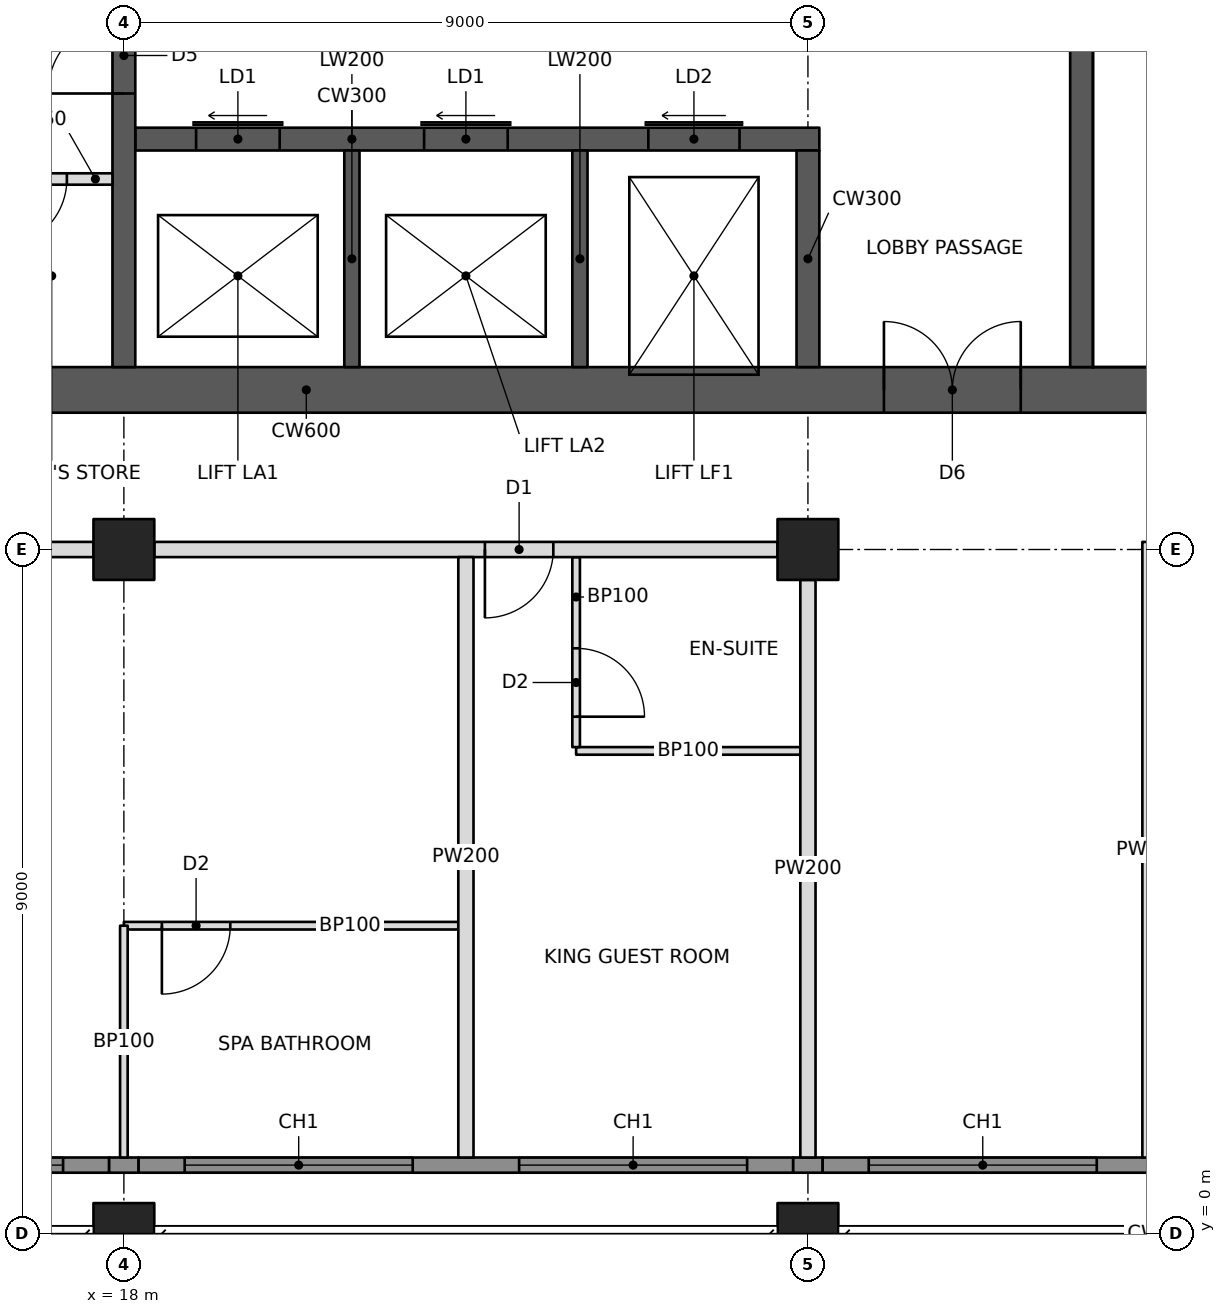
"""IFC4 building model, lengths in metres.
Left out: names, types, materials, properties, quantities, classifications, styles, units other than length and angle.
Written with IfcOpenShell. Run it as: python <this file> out.ifc"""

import sys

from ifc_helpers import new_model, si_unit, direction, frame, frame_2d, origin, origin_2d, place, context, subcontext, project, spatial, rectangle, hollow_rectangle, extrude, element, fill, save


model = new_model("IFC4")
c1 = context("Model", 3, precision=1e-05, world=origin(), true_north=direction((0.0, 1.0)))
c2 = subcontext(c1, "Body", "Model", "MODEL_VIEW")
j1 = project(units=[si_unit("LENGTHUNIT", "METRE"), si_unit("PLANEANGLEUNIT", "RADIAN")], contexts=[c1])
p1 = place(None, origin())
s1 = spatial("IfcSite", under=j1, at=p1, CompositionType="ELEMENT")
p2 = place(p1, origin())
s2 = spatial("IfcBuilding", under=s1, at=p2, CompositionType="ELEMENT")
p3 = place(p2, frame((0.0, 0.0, 51.8)))
s3 = spatial("IfcBuildingStorey", under=s2, at=p3, CompositionType="ELEMENT", Elevation=51.8)
for number, where, z_axis, x_axis in (
    (1, (18.0, 0.0, 0.0), (0.0, 0.0, 1.0), (1.0, 0.0, 0.0)),
    (2, (18.0, 9.0, 0.0), (0.0, 0.0, 1.0), (1.0, 0.0, 0.0)),
    (3, (27.0, 0.0, 0.0), (0.0, 0.0, 1.0), (1.0, 0.0, 0.0)),
    (4, (27.0, 9.0, 0.0), (0.0, 0.0, 1.0), (1.0, 0.0, 0.0)),
):
    element("IfcColumn", number, at=place(p3, frame(where, z_axis=z_axis, x_axis=x_axis)), inside=s3, PredefinedType="COLUMN", context=c2, shape_type="SweptSolid", body=[
        extrude(hollow_rectangle(XDim=0.8, YDim=0.8, WallThickness=0.1, at=origin_2d()), origin(), (0.0, 0.0, 1.0), 3.4),
    ])
p4 = place(p3, frame((10.8, 11.1, 0.0), z_axis=(0.0, 0.0, 1.0), x_axis=(1.0, 0.0, 0.0)))
e5 = element("IfcWall", 5, at=p4, inside=s3, PredefinedType="SHEAR", context=c2, shape_type="SweptSolid", body=[
    extrude(rectangle(XDim=23.4, YDim=0.6, at=frame_2d((11.7, 0.0))), origin(), (0.0, 0.0, 1.0), 3.4),
])
p5 = place(p4, frame((1.0, 0.0, 0.0)))
e6 = element("IfcOpeningElement", 6, at=p5, cuts=e5, PredefinedType="OPENING", context=c2, shape_type="SweptSolid", body=[
    extrude(rectangle(XDim=1.0, YDim=2.1, at=frame_2d((0.5, 1.05))), frame((0.0, 0.31, 0.0), z_axis=(0.0, -1.0, 0.0), x_axis=(1.0, 0.0, 0.0)), (0.0, 0.0, 1.0), 0.62),
])
p6 = place(p4, frame((17.2, 0.0, 0.0)))
e7 = element("IfcOpeningElement", 7, at=p6, cuts=e5, PredefinedType="OPENING", context=c2, shape_type="SweptSolid", body=[
    extrude(rectangle(XDim=1.8, YDim=2.1, at=frame_2d((0.9, 1.05))), frame((0.0, 0.31, 0.0), z_axis=(0.0, -1.0, 0.0), x_axis=(1.0, 0.0, 0.0)), (0.0, 0.0, 1.0), 0.62),
])
p7 = place(p3, frame((18.0, 11.4, 0.0), z_axis=(0.0, 0.0, 1.0), x_axis=(0.0, 1.0, 0.0)))
e8 = element("IfcWall", 8, at=p7, inside=s3, PredefinedType="SHEAR", context=c2, shape_type="SweptSolid", body=[
    extrude(rectangle(XDim=13.2, YDim=0.3, at=frame_2d((6.6, 0.0))), origin(), (0.0, 0.0, 1.0), 3.4),
])
p8 = place(p7, frame((3.6, 0.0, 0.0)))
e9 = element("IfcOpeningElement", 9, at=p8, cuts=e8, PredefinedType="OPENING", context=c2, shape_type="SweptSolid", body=[
    extrude(rectangle(XDim=1.0, YDim=2.1, at=frame_2d((0.5, 1.05))), frame((0.0, 0.16, 0.0), z_axis=(0.0, -1.0, 0.0), x_axis=(1.0, 0.0, 0.0)), (0.0, 0.0, 1.0), 0.32),
])
p9 = place(p7, frame((8.2, 0.0, 0.0)))
e10 = element("IfcOpeningElement", 10, at=p9, cuts=e8, PredefinedType="OPENING", context=c2, shape_type="SweptSolid", body=[
    extrude(rectangle(XDim=1.0, YDim=2.1, at=frame_2d((0.5, 1.05))), frame((0.0, 0.16, 0.0), z_axis=(0.0, -1.0, 0.0), x_axis=(1.0, 0.0, 0.0)), (0.0, 0.0, 1.0), 0.32),
])
p10 = place(p3, frame((18.15, 14.4, 0.0), z_axis=(0.0, 0.0, 1.0), x_axis=(1.0, 0.0, 0.0)))
e11 = element("IfcWall", 11, at=p10, inside=s3, PredefinedType="SHEAR", context=c2, shape_type="SweptSolid", body=[
    extrude(rectangle(XDim=9.0, YDim=0.3, at=frame_2d((4.5, 0.0))), origin(), (0.0, 0.0, 1.0), 3.4),
])
p11 = place(p10, frame((0.8, 0.0, 0.0)))
e12 = element("IfcOpeningElement", 12, at=p11, cuts=e11, PredefinedType="OPENING", context=c2, shape_type="SweptSolid", body=[
    extrude(rectangle(XDim=1.1, YDim=2.1, at=frame_2d((0.55, 1.05))), frame((0.0, 0.16, 0.0), z_axis=(0.0, -1.0, 0.0), x_axis=(1.0, 0.0, 0.0)), (0.0, 0.0, 1.0), 0.32),
])
p12 = place(p10, frame((3.8, 0.0, 0.0)))
e13 = element("IfcOpeningElement", 13, at=p12, cuts=e11, PredefinedType="OPENING", context=c2, shape_type="SweptSolid", body=[
    extrude(rectangle(XDim=1.1, YDim=2.1, at=frame_2d((0.55, 1.05))), frame((0.0, 0.16, 0.0), z_axis=(0.0, -1.0, 0.0), x_axis=(1.0, 0.0, 0.0)), (0.0, 0.0, 1.0), 0.32),
])
p13 = place(p10, frame((6.75, 0.0, 0.0)))
e14 = element("IfcOpeningElement", 14, at=p13, cuts=e11, PredefinedType="OPENING", context=c2, shape_type="SweptSolid", body=[
    extrude(rectangle(XDim=1.2, YDim=2.1, at=frame_2d((0.6, 1.05))), frame((0.0, 0.16, 0.0), z_axis=(0.0, -1.0, 0.0), x_axis=(1.0, 0.0, 0.0)), (0.0, 0.0, 1.0), 0.32),
])
p14 = place(p3, frame((27.0, 11.4, 0.0), z_axis=(0.0, 0.0, 1.0), x_axis=(0.0, 1.0, 0.0)))
e15 = element("IfcWall", 15, at=p14, inside=s3, PredefinedType="SHEAR", context=c2, shape_type="SweptSolid", body=[
    extrude(rectangle(XDim=2.85, YDim=0.3, at=frame_2d((1.425, 0.0))), origin(), (0.0, 0.0, 1.0), 3.4),
])
for number, where, z_axis, x_axis in (
    (16, (21.0, 11.4, 0.0), (0.0, 0.0, 1.0), (0.0, 1.0, 0.0)),
    (17, (24.0, 11.4, 0.0), (0.0, 0.0, 1.0), (0.0, 1.0, 0.0)),
):
    element("IfcWall", number, at=place(p3, frame(where, z_axis=z_axis, x_axis=x_axis)), inside=s3, PredefinedType="SHEAR", context=c2, shape_type="SweptSolid", body=[
        extrude(rectangle(XDim=2.85, YDim=0.2, at=frame_2d((1.425, 0.0))), origin(), (0.0, 0.0, 1.0), 3.4),
    ])
p15 = place(p3, frame((30.6, 11.4, 0.0), z_axis=(0.0, 0.0, 1.0), x_axis=(0.0, 1.0, 0.0)))
e18 = element("IfcWall", 18, at=p15, inside=s3, PredefinedType="SHEAR", context=c2, shape_type="SweptSolid", body=[
    extrude(rectangle(XDim=13.2, YDim=0.3, at=frame_2d((6.6, 0.0))), origin(), (0.0, 0.0, 1.0), 3.4),
])
p16 = place(p3, frame((9.4, 9.0, 0.0), z_axis=(0.0, 0.0, 1.0), x_axis=(1.0, 0.0, 0.0)))
e19 = element("IfcWall", 19, at=p16, inside=s3, PredefinedType="PARTITIONING", context=c2, shape_type="SweptSolid", body=[
    extrude(rectangle(XDim=8.2, YDim=0.2, at=frame_2d((4.1, 0.0))), origin(), (0.0, 0.0, 1.0), 2.405),
])
p17 = place(p16, frame((2.95, 0.0, 0.0)))
e20 = element("IfcOpeningElement", 20, at=p17, cuts=e19, PredefinedType="OPENING", context=c2, shape_type="SweptSolid", body=[
    extrude(rectangle(XDim=0.9, YDim=2.1, at=frame_2d((0.45, 1.05))), frame((0.0, 0.11, 0.0), z_axis=(0.0, -1.0, 0.0), x_axis=(1.0, 0.0, 0.0)), (0.0, 0.0, 1.0), 0.22),
])
p18 = place(p16, frame((4.35, 0.0, 0.0)))
e21 = element("IfcOpeningElement", 21, at=p18, cuts=e19, PredefinedType="OPENING", context=c2, shape_type="SweptSolid", body=[
    extrude(rectangle(XDim=0.9, YDim=2.1, at=frame_2d((0.45, 1.05))), frame((0.0, 0.11, 0.0), z_axis=(0.0, -1.0, 0.0), x_axis=(1.0, 0.0, 0.0)), (0.0, 0.0, 1.0), 0.22),
])
p19 = place(p3, frame((18.4, 9.0, 0.0), z_axis=(0.0, 0.0, 1.0), x_axis=(1.0, 0.0, 0.0)))
e22 = element("IfcWall", 22, at=p19, inside=s3, PredefinedType="PARTITIONING", context=c2, shape_type="SweptSolid", body=[
    extrude(rectangle(XDim=8.2, YDim=0.2, at=frame_2d((4.1, 0.0))), origin(), (0.0, 0.0, 1.0), 2.405),
])
p20 = place(p19, frame((4.35, 0.0, 0.0)))
e23 = element("IfcOpeningElement", 23, at=p20, cuts=e22, PredefinedType="OPENING", context=c2, shape_type="SweptSolid", body=[
    extrude(rectangle(XDim=0.9, YDim=2.1, at=frame_2d((0.45, 1.05))), frame((0.0, 0.11, 0.0), z_axis=(0.0, -1.0, 0.0), x_axis=(1.0, 0.0, 0.0)), (0.0, 0.0, 1.0), 0.22),
])
p21 = place(p3, frame((22.5, 8.9, 0.0), z_axis=(0.0, 0.0, 1.0), x_axis=(0.0, -1.0, 0.0)))
e24 = element("IfcWall", 24, at=p21, inside=s3, PredefinedType="PARTITIONING", context=c2, shape_type="SweptSolid", body=[
    extrude(rectangle(XDim=7.9, YDim=0.2, at=frame_2d((3.95, 0.0))), origin(), (0.0, 0.0, 1.0), 2.404),
])
p22 = place(p3, frame((27.0, 8.6, 0.0), z_axis=(0.0, 0.0, 1.0), x_axis=(0.0, -1.0, 0.0)))
e25 = element("IfcWall", 25, at=p22, inside=s3, PredefinedType="PARTITIONING", context=c2, shape_type="SweptSolid", body=[
    extrude(rectangle(XDim=7.6, YDim=0.2, at=frame_2d((3.8, 0.0))), origin(), (0.0, 0.0, 1.0), 2.405),
])
p23 = place(p3, frame((31.5, 9.1, 0.0), z_axis=(0.0, 0.0, 1.0), x_axis=(0.0, -1.0, 0.0)))
e26 = element("IfcWall", 26, at=p23, inside=s3, PredefinedType="PARTITIONING", context=c2, shape_type="SweptSolid", body=[
    extrude(rectangle(XDim=8.1, YDim=0.2, at=frame_2d((4.05, 0.0))), origin(), (0.0, 0.0, 1.0), 2.404),
])
p24 = place(p3, frame((18.0, 4.05, 0.0), z_axis=(0.0, 0.0, 1.0), x_axis=(1.0, 0.0, 0.0)))
e27 = element("IfcWall", 27, at=p24, inside=s3, PredefinedType="PARTITIONING", context=c2, shape_type="SweptSolid", body=[
    extrude(rectangle(XDim=4.4, YDim=0.1, at=frame_2d((2.2, 0.0))), origin(), (0.0, 0.0, 1.0), 2.404),
])
p25 = place(p24, frame((0.5, 0.0, 0.0)))
e28 = element("IfcOpeningElement", 28, at=p25, cuts=e27, PredefinedType="OPENING", context=c2, shape_type="SweptSolid", body=[
    extrude(rectangle(XDim=0.9, YDim=2.1, at=frame_2d((0.45, 1.05))), frame((0.0, 0.06, 0.0), z_axis=(0.0, -1.0, 0.0), x_axis=(1.0, 0.0, 0.0)), (0.0, 0.0, 1.0), 0.12),
])
p26 = place(p3, frame((18.0, 4.05, 0.0), z_axis=(0.0, 0.0, 1.0), x_axis=(0.0, -1.0, 0.0)))
e29 = element("IfcWall", 29, at=p26, inside=s3, PredefinedType="PARTITIONING", context=c2, shape_type="SweptSolid", body=[
    extrude(rectangle(XDim=3.05, YDim=0.1, at=frame_2d((1.525, 0.0))), origin(), (0.0, 0.0, 1.0), 2.405),
])
p27 = place(p3, frame((23.95, 6.35, 0.0), z_axis=(0.0, 0.0, 1.0), x_axis=(1.0, 0.0, 0.0)))
e30 = element("IfcWall", 30, at=p27, inside=s3, PredefinedType="PARTITIONING", context=c2, shape_type="SweptSolid", body=[
    extrude(rectangle(XDim=2.95, YDim=0.1, at=frame_2d((1.475, 0.0))), origin(), (0.0, 0.0, 1.0), 2.404),
])
p28 = place(p3, frame((23.95, 8.9, 0.0), z_axis=(0.0, 0.0, 1.0), x_axis=(0.0, -1.0, 0.0)))
e31 = element("IfcWall", 31, at=p28, inside=s3, PredefinedType="PARTITIONING", context=c2, shape_type="SweptSolid", body=[
    extrude(rectangle(XDim=2.5, YDim=0.1, at=frame_2d((1.25, 0.0))), origin(), (0.0, 0.0, 1.0), 2.404),
])
p29 = place(p28, frame((1.2, 0.0, 0.0)))
e32 = element("IfcOpeningElement", 32, at=p29, cuts=e31, PredefinedType="OPENING", context=c2, shape_type="SweptSolid", body=[
    extrude(rectangle(XDim=0.9, YDim=2.1, at=frame_2d((0.45, 1.05))), frame((0.0, 0.06, 0.0), z_axis=(0.0, -1.0, 0.0), x_axis=(1.0, 0.0, 0.0)), (0.0, 0.0, 1.0), 0.12),
])
p30 = place(p3, frame((14.55, 13.875, 0.0), z_axis=(0.0, 0.0, 1.0), x_axis=(1.0, 0.0, 0.0)))
e33 = element("IfcWall", 33, at=p30, inside=s3, PredefinedType="PARTITIONING", context=c2, shape_type="SweptSolid", body=[
    extrude(rectangle(XDim=3.3, YDim=0.15, at=frame_2d((1.65, 0.0))), origin(), (0.0, 0.0, 1.0), 3.2),
])
p31 = place(p30, frame((0.2, 0.0, 0.0)))
e34 = element("IfcOpeningElement", 34, at=p31, cuts=e33, PredefinedType="OPENING", context=c2, shape_type="SweptSolid", body=[
    extrude(rectangle(XDim=0.9, YDim=2.1, at=frame_2d((0.45, 1.05))), frame((0.0, 0.085, 0.0), z_axis=(0.0, -1.0, 0.0), x_axis=(1.0, 0.0, 0.0)), (0.0, 0.0, 1.0), 0.17),
])
p32 = place(p30, frame((1.8, 0.0, 0.0)))
e35 = element("IfcOpeningElement", 35, at=p32, cuts=e33, PredefinedType="OPENING", context=c2, shape_type="SweptSolid", body=[
    extrude(rectangle(XDim=0.9, YDim=2.1, at=frame_2d((0.45, 1.05))), frame((0.0, 0.085, 0.0), z_axis=(0.0, -1.0, 0.0), x_axis=(1.0, 0.0, 0.0)), (0.0, 0.0, 1.0), 0.17),
])
p33 = place(p3, frame((9.135, 0.9, 0.0), z_axis=(0.0, 0.0, 1.0), x_axis=(1.0, 0.0, 0.0)))
e36 = element("IfcWall", 36, at=p33, inside=s3, PredefinedType="SOLIDWALL", context=c2, shape_type="SweptSolid", body=[
    extrude(rectangle(XDim=8.671, YDim=0.2, at=frame_2d((4.335, 0.0))), origin(), (0.0, 0.0, 1.0), 3.2),
])
p34 = place(p33, frame((0.665, 0.0, 0.6)))
e37 = element("IfcOpeningElement", 37, at=p34, cuts=e36, PredefinedType="OPENING", context=c2, shape_type="SweptSolid", body=[
    extrude(rectangle(XDim=3.0, YDim=2.2, at=frame_2d((1.5, 1.1))), frame((0.0, 0.11, 0.0), z_axis=(0.0, -1.0, 0.0), x_axis=(1.0, 0.0, 0.0)), (0.0, 0.0, 1.0), 0.22),
])
p35 = place(p33, frame((5.065, 0.0, 0.6)))
e38 = element("IfcOpeningElement", 38, at=p35, cuts=e36, PredefinedType="OPENING", context=c2, shape_type="SweptSolid", body=[
    extrude(rectangle(XDim=3.0, YDim=2.2, at=frame_2d((1.5, 1.1))), frame((0.0, 0.11, 0.0), z_axis=(0.0, -1.0, 0.0), x_axis=(1.0, 0.0, 0.0)), (0.0, 0.0, 1.0), 0.22),
])
p36 = place(p3, frame((17.806, 0.9, 0.0), z_axis=(0.0, 0.0, 1.0), x_axis=(1.0, 0.0, 0.0)))
e39 = element("IfcWall", 39, at=p36, inside=s3, PredefinedType="SOLIDWALL", context=c2, shape_type="SweptSolid", body=[
    extrude(rectangle(XDim=0.388, YDim=0.2, at=frame_2d((0.194, 0.0))), origin(), (0.0, 0.0, 1.0), 2.404),
])
p37 = place(p3, frame((18.194, 0.9, 0.0), z_axis=(0.0, 0.0, 1.0), x_axis=(1.0, 0.0, 0.0)))
e40 = element("IfcWall", 40, at=p37, inside=s3, PredefinedType="SOLIDWALL", context=c2, shape_type="SweptSolid", body=[
    extrude(rectangle(XDim=8.612, YDim=0.2, at=frame_2d((4.306, 0.0))), origin(), (0.0, 0.0, 1.0), 3.2),
])
p38 = place(p37, frame((0.606, 0.0, 0.6)))
e41 = element("IfcOpeningElement", 41, at=p38, cuts=e40, PredefinedType="OPENING", context=c2, shape_type="SweptSolid", body=[
    extrude(rectangle(XDim=3.0, YDim=2.2, at=frame_2d((1.5, 1.1))), frame((0.0, 0.11, 0.0), z_axis=(0.0, -1.0, 0.0), x_axis=(1.0, 0.0, 0.0)), (0.0, 0.0, 1.0), 0.22),
])
p39 = place(p37, frame((5.006, 0.0, 0.6)))
e42 = element("IfcOpeningElement", 42, at=p39, cuts=e40, PredefinedType="OPENING", context=c2, shape_type="SweptSolid", body=[
    extrude(rectangle(XDim=3.0, YDim=2.2, at=frame_2d((1.5, 1.1))), frame((0.0, 0.11, 0.0), z_axis=(0.0, -1.0, 0.0), x_axis=(1.0, 0.0, 0.0)), (0.0, 0.0, 1.0), 0.22),
])
p40 = place(p3, frame((26.806, 0.9, 0.0), z_axis=(0.0, 0.0, 1.0), x_axis=(1.0, 0.0, 0.0)))
e43 = element("IfcWall", 43, at=p40, inside=s3, PredefinedType="SOLIDWALL", context=c2, shape_type="SweptSolid", body=[
    extrude(rectangle(XDim=0.388, YDim=0.2, at=frame_2d((0.194, 0.0))), origin(), (0.0, 0.0, 1.0), 2.404),
])
p41 = place(p3, frame((27.194, 0.9, 0.0), z_axis=(0.0, 0.0, 1.0), x_axis=(1.0, 0.0, 0.0)))
e44 = element("IfcWall", 44, at=p41, inside=s3, PredefinedType="SOLIDWALL", context=c2, shape_type="SweptSolid", body=[
    extrude(rectangle(XDim=8.671, YDim=0.2, at=frame_2d((4.335, 0.0))), origin(), (0.0, 0.0, 1.0), 3.2),
])
p42 = place(p41, frame((0.606, 0.0, 0.6)))
e45 = element("IfcOpeningElement", 45, at=p42, cuts=e44, PredefinedType="OPENING", context=c2, shape_type="SweptSolid", body=[
    extrude(rectangle(XDim=3.0, YDim=2.2, at=frame_2d((1.5, 1.1))), frame((0.0, 0.11, 0.0), z_axis=(0.0, -1.0, 0.0), x_axis=(1.0, 0.0, 0.0)), (0.0, 0.0, 1.0), 0.22),
])
p43 = place(p41, frame((5.006, 0.0, 0.6)))
e46 = element("IfcOpeningElement", 46, at=p43, cuts=e44, PredefinedType="OPENING", context=c2, shape_type="SweptSolid", body=[
    extrude(rectangle(XDim=3.0, YDim=2.2, at=frame_2d((1.5, 1.1))), frame((0.0, 0.11, 0.0), z_axis=(0.0, -1.0, 0.0), x_axis=(1.0, 0.0, 0.0)), (0.0, 0.0, 1.0), 0.22),
])
p44 = place(p35, origin())
e47 = element("IfcWindow", 47, at=p44, inside=s3, PartitioningType="TRIPLE_PANEL_VERTICAL", PredefinedType="WINDOW", context=c2, shape_type="SweptSolid", body=[
    extrude(rectangle(XDim=3.0, YDim=2.2, at=frame_2d((1.5, 1.1))), frame((0.0, 0.03, 0.0), z_axis=(0.0, -1.0, 0.0), x_axis=(1.0, 0.0, 0.0)), (0.0, 0.0, 1.0), 0.06),
])
fill(e38, e47)
p45 = place(p38, origin())
e48 = element("IfcWindow", 48, at=p45, inside=s3, PartitioningType="TRIPLE_PANEL_VERTICAL", PredefinedType="WINDOW", context=c2, shape_type="SweptSolid", body=[
    extrude(rectangle(XDim=3.0, YDim=2.2, at=frame_2d((1.5, 1.1))), frame((0.0, 0.03, 0.0), z_axis=(0.0, -1.0, 0.0), x_axis=(1.0, 0.0, 0.0)), (0.0, 0.0, 1.0), 0.06),
])
fill(e41, e48)
p46 = place(p39, origin())
e49 = element("IfcWindow", 49, at=p46, inside=s3, PartitioningType="TRIPLE_PANEL_VERTICAL", PredefinedType="WINDOW", context=c2, shape_type="SweptSolid", body=[
    extrude(rectangle(XDim=3.0, YDim=2.2, at=frame_2d((1.5, 1.1))), frame((0.0, 0.03, 0.0), z_axis=(0.0, -1.0, 0.0), x_axis=(1.0, 0.0, 0.0)), (0.0, 0.0, 1.0), 0.06),
])
fill(e42, e49)
p47 = place(p42, origin())
e50 = element("IfcWindow", 50, at=p47, inside=s3, PartitioningType="TRIPLE_PANEL_VERTICAL", PredefinedType="WINDOW", context=c2, shape_type="SweptSolid", body=[
    extrude(rectangle(XDim=3.0, YDim=2.2, at=frame_2d((1.5, 1.1))), frame((0.0, 0.03, 0.0), z_axis=(0.0, -1.0, 0.0), x_axis=(1.0, 0.0, 0.0)), (0.0, 0.0, 1.0), 0.06),
])
fill(e45, e50)
p48 = place(p25, frame((0.9, 0.0, 0.0), z_axis=(0.0, 0.0, 1.0), x_axis=(-1.0, 0.0, 0.0)))
e51 = element("IfcDoor", 51, at=p48, inside=s3, OperationType="SINGLE_SWING_RIGHT", PredefinedType="DOOR", context=c2, shape_type="SweptSolid", body=[
    extrude(rectangle(XDim=0.9, YDim=2.1, at=frame_2d((0.45, 1.05))), frame((0.0, 0.025, 0.0), z_axis=(0.0, -1.0, 0.0), x_axis=(1.0, 0.0, 0.0)), (0.0, 0.0, 1.0), 0.05),
])
fill(e28, e51)
p49 = place(p29, origin())
e52 = element("IfcDoor", 52, at=p49, inside=s3, OperationType="SINGLE_SWING_RIGHT", PredefinedType="DOOR", context=c2, shape_type="SweptSolid", body=[
    extrude(rectangle(XDim=0.9, YDim=2.1, at=frame_2d((0.45, 1.05))), frame((0.0, 0.025, 0.0), z_axis=(0.0, -1.0, 0.0), x_axis=(1.0, 0.0, 0.0)), (0.0, 0.0, 1.0), 0.05),
])
fill(e32, e52)
p50 = place(p20, frame((0.9, 0.0, 0.0), z_axis=(0.0, 0.0, 1.0), x_axis=(-1.0, 0.0, 0.0)))
e53 = element("IfcDoor", 53, at=p50, inside=s3, OperationType="SINGLE_SWING_RIGHT", PredefinedType="DOOR", context=c2, shape_type="SweptSolid", body=[
    extrude(rectangle(XDim=0.9, YDim=2.1, at=frame_2d((0.45, 1.05))), frame((0.0, 0.025, 0.0), z_axis=(0.0, -1.0, 0.0), x_axis=(1.0, 0.0, 0.0)), (0.0, 0.0, 1.0), 0.05),
])
fill(e23, e53)
p51 = place(p32, frame((0.9, 0.0, 0.0), z_axis=(0.0, 0.0, 1.0), x_axis=(-1.0, 0.0, 0.0)))
e54 = element("IfcDoor", 54, at=p51, inside=s3, OperationType="SINGLE_SWING_RIGHT", PredefinedType="DOOR", context=c2, shape_type="SweptSolid", body=[
    extrude(rectangle(XDim=0.9, YDim=2.1, at=frame_2d((0.45, 1.05))), frame((0.0, 0.025, 0.0), z_axis=(0.0, -1.0, 0.0), x_axis=(1.0, 0.0, 0.0)), (0.0, 0.0, 1.0), 0.05),
])
fill(e35, e54)
p52 = place(p6, origin())
e55 = element("IfcDoor", 55, at=p52, inside=s3, OperationType="DOUBLE_DOOR_SINGLE_SWING", PredefinedType="DOOR", context=c2, shape_type="SweptSolid", body=[
    extrude(rectangle(XDim=1.8, YDim=2.1, at=frame_2d((0.9, 1.05))), frame((0.0, 0.025, 0.0), z_axis=(0.0, -1.0, 0.0), x_axis=(1.0, 0.0, 0.0)), (0.0, 0.0, 1.0), 0.05),
])
fill(e7, e55)
p53 = place(p8, origin())
e56 = element("IfcDoor", 56, at=p53, inside=s3, OperationType="SINGLE_SWING_LEFT", PredefinedType="DOOR", context=c2, shape_type="SweptSolid", body=[
    extrude(rectangle(XDim=1.0, YDim=2.1, at=frame_2d((0.5, 1.05))), frame((0.0, 0.025, 0.0), z_axis=(0.0, -1.0, 0.0), x_axis=(1.0, 0.0, 0.0)), (0.0, 0.0, 1.0), 0.05),
])
fill(e9, e56)
p54 = place(p11, origin())
e57 = element("IfcDoor", 57, at=p54, inside=s3, OperationType="SLIDING_TO_LEFT", PredefinedType="DOOR", context=c2, shape_type="SweptSolid", body=[
    extrude(rectangle(XDim=1.1, YDim=2.1, at=frame_2d((0.55, 1.05))), frame((0.0, 0.025, 0.0), z_axis=(0.0, -1.0, 0.0), x_axis=(1.0, 0.0, 0.0)), (0.0, 0.0, 1.0), 0.05),
])
fill(e12, e57)
p55 = place(p12, origin())
e58 = element("IfcDoor", 58, at=p55, inside=s3, OperationType="SLIDING_TO_LEFT", PredefinedType="DOOR", context=c2, shape_type="SweptSolid", body=[
    extrude(rectangle(XDim=1.1, YDim=2.1, at=frame_2d((0.55, 1.05))), frame((0.0, 0.025, 0.0), z_axis=(0.0, -1.0, 0.0), x_axis=(1.0, 0.0, 0.0)), (0.0, 0.0, 1.0), 0.05),
])
fill(e13, e58)
p56 = place(p13, origin())
e59 = element("IfcDoor", 59, at=p56, inside=s3, OperationType="SLIDING_TO_LEFT", PredefinedType="DOOR", context=c2, shape_type="SweptSolid", body=[
    extrude(rectangle(XDim=1.2, YDim=2.1, at=frame_2d((0.6, 1.05))), frame((0.0, 0.025, 0.0), z_axis=(0.0, -1.0, 0.0), x_axis=(1.0, 0.0, 0.0)), (0.0, 0.0, 1.0), 0.05),
])
fill(e14, e59)
save(model, sys.argv[1])
